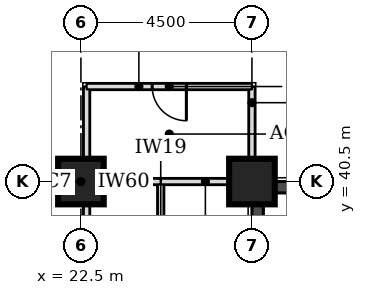
"""IFC4 building model, lengths in metres.
Left out: names, types, materials, properties, quantities, classifications, styles, units other than length and angle.
Written with IfcOpenShell. Run it as: python <this file> out.ifc"""

import sys

from ifc_helpers import new_model, si_unit, direction, frame, frame_2d, origin, origin_2d, place, context, subcontext, project, spatial, rectangle, extrude, element, fill, save


model = new_model("IFC4")
c1 = context("Model", 3, precision=1e-05, world=origin(), true_north=direction((0.0, 1.0)))
c2 = subcontext(c1, "Body", "Model", "MODEL_VIEW")
j1 = project(units=[si_unit("LENGTHUNIT", "METRE"), si_unit("PLANEANGLEUNIT", "RADIAN")], contexts=[c1])
p1 = place(None, origin())
s1 = spatial("IfcSite", under=j1, at=p1, CompositionType="ELEMENT")
p2 = place(p1, origin())
s2 = spatial("IfcBuilding", under=s1, at=p2, CompositionType="ELEMENT")
p3 = place(p2, frame((0.0, 0.0, 39.6)))
s3 = spatial("IfcBuildingStorey", under=s2, at=p3, CompositionType="ELEMENT", Elevation=39.6)
for number, where, z_axis, x_axis in (
    (1, (22.5, 40.5, 0.0), (0.0, 0.0, 1.0), (1.0, 0.0, 0.0)),
    (2, (27.0, 40.5, 0.0), (0.0, 0.0, 1.0), (1.0, 0.0, 0.0)),
):
    element("IfcColumn", number, at=place(p3, frame(where, z_axis=z_axis, x_axis=x_axis)), inside=s3, PredefinedType="COLUMN", context=c2, shape_type="SweptSolid", body=[
        extrude(rectangle(XDim=1.2, YDim=1.2, at=origin_2d()), origin(), (0.0, 0.0, 1.0), 3.3),
    ])
p4 = place(p3, frame((27.3, 40.35, 0.0), z_axis=(0.0, 0.0, 1.0), x_axis=(1.0, 0.0, 0.0)))
e3 = element("IfcWall", 3, at=p4, inside=s3, PredefinedType="SHEAR", context=c2, shape_type="SweptSolid", body=[
    extrude(rectangle(XDim=8.4, YDim=0.3, at=frame_2d((4.2, 0.0))), origin(), (0.0, 0.0, 1.0), 3.3),
])
p5 = place(p4, frame((6.4, 0.0, 0.0)))
e4 = element("IfcOpeningElement", 4, at=p5, cuts=e3, PredefinedType="OPENING", context=c2, shape_type="SweptSolid", body=[
    extrude(rectangle(XDim=1.1, YDim=2.1, at=frame_2d((0.55, 1.05))), frame((0.0, 0.16, 0.0), z_axis=(0.0, -1.0, 0.0), x_axis=(1.0, 0.0, 0.0)), (0.0, 0.0, 1.0), 0.32),
])
p6 = place(p3, frame((27.15, 31.5, 0.0), z_axis=(0.0, 0.0, 1.0), x_axis=(0.0, 1.0, 0.0)))
e5 = element("IfcWall", 5, at=p6, inside=s3, PredefinedType="SHEAR", context=c2, shape_type="SweptSolid", body=[
    extrude(rectangle(XDim=9.0, YDim=0.3, at=frame_2d((4.5, 0.0))), origin(), (0.0, 0.0, 1.0), 3.3),
])
p7 = place(p6, frame((0.4, 0.0, 0.0)))
e6 = element("IfcOpeningElement", 6, at=p7, cuts=e5, PredefinedType="OPENING", context=c2, shape_type="SweptSolid", body=[
    extrude(rectangle(XDim=1.1, YDim=2.1, at=frame_2d((0.55, 1.05))), frame((0.0, 0.16, 0.0), z_axis=(0.0, -1.0, 0.0), x_axis=(1.0, 0.0, 0.0)), (0.0, 0.0, 1.0), 0.32),
])
p8 = place(p3, frame((22.65, 27.15, 0.0), z_axis=(0.0, 0.0, 1.0), x_axis=(0.0, 1.0, 0.0)))
e7 = element("IfcWall", 7, at=p8, inside=s3, PredefinedType="PARTITIONING", context=c2, shape_type="SweptSolid", body=[
    extrude(rectangle(XDim=15.85, YDim=0.15, at=frame_2d((7.925, 0.0))), origin(), (0.0, 0.0, 1.0), 3.08),
])
p9 = place(p8, frame((9.225, 0.0, 0.0)))
e8 = element("IfcOpeningElement", 8, at=p9, cuts=e7, PredefinedType="OPENING", context=c2, shape_type="SweptSolid", body=[
    extrude(rectangle(XDim=0.9, YDim=2.1, at=frame_2d((0.45, 1.05))), frame((0.0, 0.085, 0.0), z_axis=(0.0, -1.0, 0.0), x_axis=(1.0, 0.0, 0.0)), (0.0, 0.0, 1.0), 0.17),
])
p10 = place(p3, frame((24.6, 27.15, 0.0), z_axis=(0.0, 0.0, 1.0), x_axis=(0.0, 1.0, 0.0)))
e9 = element("IfcWall", 9, at=p10, inside=s3, PredefinedType="PARTITIONING", context=c2, shape_type="SweptSolid", body=[
    extrude(rectangle(XDim=13.35, YDim=0.15, at=frame_2d((6.675, 0.0))), origin(), (0.0, 0.0, 1.0), 3.08),
])
p11 = place(p3, frame((24.6, 40.5, 0.0), z_axis=(0.0, 0.0, 1.0), x_axis=(1.0, 0.0, 0.0)))
e10 = element("IfcWall", 10, at=p11, inside=s3, PredefinedType="PARTITIONING", context=c2, shape_type="SweptSolid", body=[
    extrude(rectangle(XDim=2.35, YDim=0.15, at=frame_2d((1.175, 0.0))), origin(), (0.0, 0.0, 1.0), 2.33),
])
p12 = place(p3, frame((27.0, 40.55, 0.0), z_axis=(0.0, 0.0, 1.0), x_axis=(0.0, 1.0, 0.0)))
e11 = element("IfcWall", 11, at=p12, inside=s3, PredefinedType="PARTITIONING", context=c2, shape_type="SweptSolid", body=[
    extrude(rectangle(XDim=2.45, YDim=0.15, at=frame_2d((1.225, 0.0))), origin(), (0.0, 0.0, 1.0), 3.08),
])
p13 = place(p3, frame((22.65, 43.0, 0.0), z_axis=(0.0, 0.0, 1.0), x_axis=(1.0, 0.0, 0.0)))
e12 = element("IfcWall", 12, at=p13, inside=s3, PredefinedType="PARTITIONING", context=c2, shape_type="SweptSolid", body=[
    extrude(rectangle(XDim=4.35, YDim=0.15, at=frame_2d((2.175, 0.0))), origin(), (0.0, 0.0, 1.0), 3.08),
])
p14 = place(p13, frame((1.725, 0.0, 0.0)))
e13 = element("IfcOpeningElement", 13, at=p14, cuts=e12, PredefinedType="OPENING", context=c2, shape_type="SweptSolid", body=[
    extrude(rectangle(XDim=0.9, YDim=2.1, at=frame_2d((0.45, 1.05))), frame((0.0, 0.085, 0.0), z_axis=(0.0, -1.0, 0.0), x_axis=(1.0, 0.0, 0.0)), (0.0, 0.0, 1.0), 0.17),
])
p15 = place(p3, frame((22.65, 40.5, 0.0), z_axis=(0.0, 0.0, 1.0), x_axis=(1.0, 0.0, 0.0)))
e14 = element("IfcWall", 14, at=p15, inside=s3, PredefinedType="PARTITIONING", context=c2, shape_type="SweptSolid", body=[
    extrude(rectangle(XDim=1.95, YDim=0.15, at=frame_2d((0.975, 0.0))), origin(), (0.0, 0.0, 1.0), 2.33),
])
p16 = place(p14, frame((0.9, 0.0, 0.0), z_axis=(0.0, 0.0, 1.0), x_axis=(-1.0, 0.0, 0.0)))
e15 = element("IfcDoor", 15, at=p16, inside=s3, OperationType="SINGLE_SWING_LEFT", PredefinedType="DOOR", context=c2, shape_type="SweptSolid", body=[
    extrude(rectangle(XDim=0.9, YDim=2.1, at=frame_2d((0.45, 1.05))), frame((0.0, 0.025, 0.0), z_axis=(0.0, -1.0, 0.0), x_axis=(1.0, 0.0, 0.0)), (0.0, 0.0, 1.0), 0.05),
])
fill(e13, e15)
save(model, sys.argv[1])
